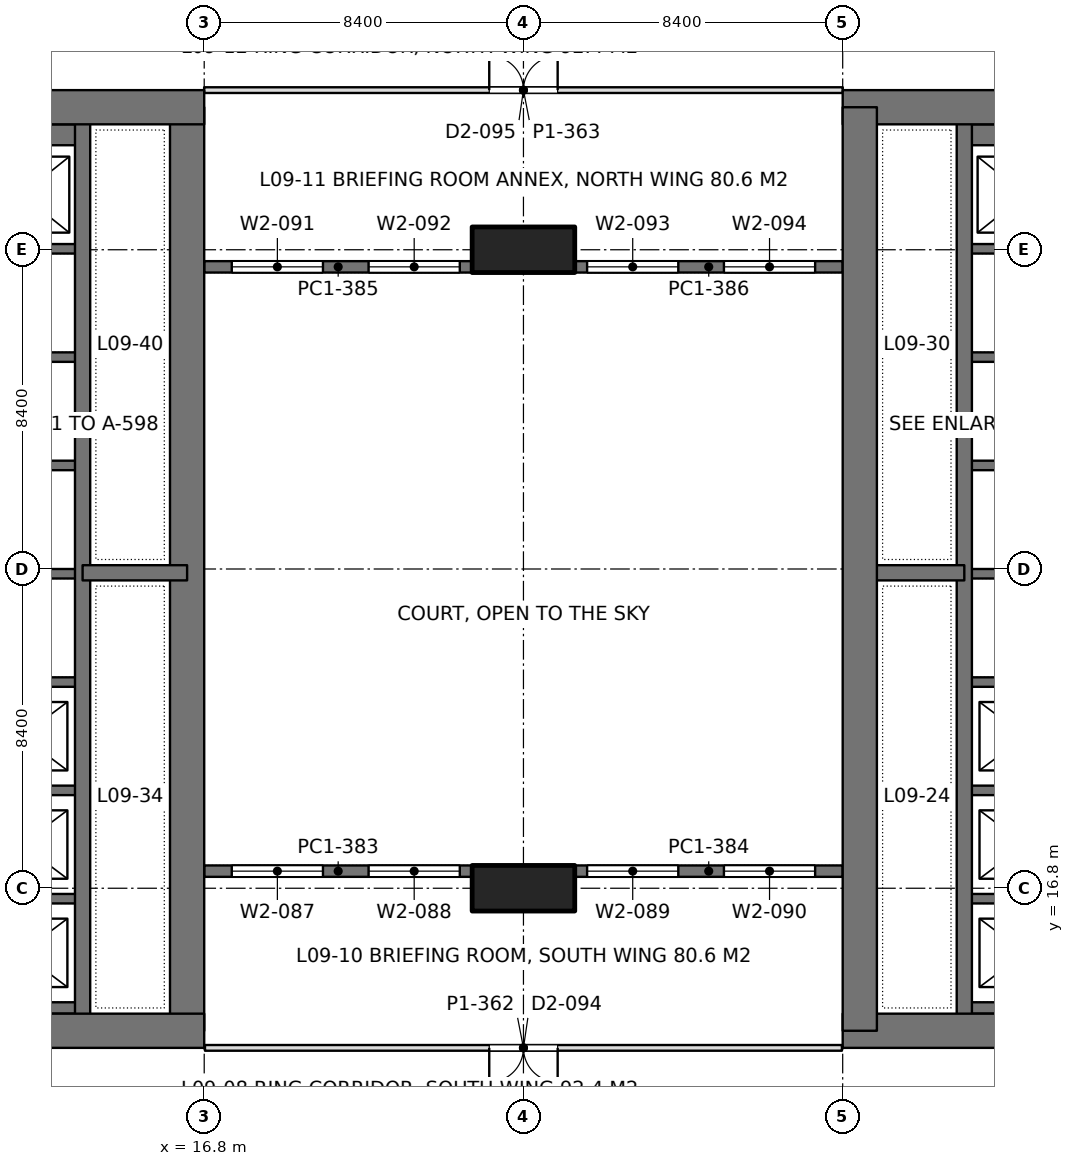
"""IFC4 building model, lengths in metres.
Left out: names, types, materials, properties, quantities, classifications, styles, units other than length and angle.
Written with IfcOpenShell. Run it as: python <this file> out.ifc"""

import sys

from ifc_helpers import new_model, si_unit, direction, frame, frame_2d, origin, origin_2d, place, context, subcontext, project, spatial, rectangle, extrude, element, fill, save


model = new_model("IFC4")
c1 = context("Model", 3, precision=1e-05, world=origin(), true_north=direction((0.0, 1.0)))
c2 = subcontext(c1, "Body", "Model", "MODEL_VIEW")
j1 = project(units=[si_unit("LENGTHUNIT", "METRE"), si_unit("PLANEANGLEUNIT", "RADIAN")], contexts=[c1])
p1 = place(None, origin())
s1 = spatial("IfcSite", under=j1, at=p1, CompositionType="ELEMENT")
p2 = place(p1, origin())
s2 = spatial("IfcBuilding", under=s1, at=p2, CompositionType="ELEMENT")
p3 = place(p2, frame((0.0, 0.0, 41.4)))
s3 = spatial("IfcBuildingStorey", under=s2, at=p3, CompositionType="ELEMENT", Elevation=41.4)
for number, where, z_axis, x_axis in (
    (1, (25.2, 16.8, 0.0), (0.0, 0.0, 1.0), (1.0, 0.0, 0.0)),
    (2, (25.2, 33.6, 0.0), (0.0, 0.0, 1.0), (1.0, 0.0, 0.0)),
):
    element("IfcColumn", number, at=place(p3, frame(where, z_axis=z_axis, x_axis=x_axis)), inside=s3, PredefinedType="COLUMN", context=c2, shape_type="SweptSolid", body=[
        extrude(rectangle(XDim=2.7, YDim=1.2, at=origin_2d()), origin(), (0.0, 0.0, 1.0), 4.5),
    ])
p4 = place(p3, frame((-1.2, 13.05, 0.0), z_axis=(0.0, 0.0, 1.0), x_axis=(1.0, 0.0, 0.0)))
e3 = element("IfcWall", 3, at=p4, inside=s3, PredefinedType="SHEAR", context=c2, shape_type="SweptSolid", body=[
    extrude(rectangle(XDim=18.0, YDim=0.9, at=frame_2d((9.0, 0.0))), origin(), (0.0, 0.0, 1.0), 4.5),
])
p5 = place(p4, frame((8.95, 0.0, 0.0)))
e4 = element("IfcOpeningElement", 4, at=p5, cuts=e3, PredefinedType="OPENING", context=c2, shape_type="SweptSolid", body=[
    extrude(rectangle(XDim=1.8, YDim=2.4, at=frame_2d((0.9, 1.2))), frame((0.0, 0.46, 0.0), z_axis=(0.0, -1.0, 0.0), x_axis=(1.0, 0.0, 0.0)), (0.0, 0.0, 1.0), 0.92),
])
p6 = place(p3, frame((-1.2, 37.35, 0.0), z_axis=(0.0, 0.0, 1.0), x_axis=(1.0, 0.0, 0.0)))
e5 = element("IfcWall", 5, at=p6, inside=s3, PredefinedType="SHEAR", context=c2, shape_type="SweptSolid", body=[
    extrude(rectangle(XDim=18.0, YDim=0.9, at=frame_2d((9.0, 0.0))), origin(), (0.0, 0.0, 1.0), 4.5),
])
p7 = place(p6, frame((8.95, 0.0, 0.0)))
e6 = element("IfcOpeningElement", 6, at=p7, cuts=e5, PredefinedType="OPENING", context=c2, shape_type="SweptSolid", body=[
    extrude(rectangle(XDim=1.8, YDim=2.4, at=frame_2d((0.9, 1.2))), frame((0.0, 0.46, 0.0), z_axis=(0.0, -1.0, 0.0), x_axis=(1.0, 0.0, 0.0)), (0.0, 0.0, 1.0), 0.92),
])
p8 = place(p3, frame((16.35, 13.05, 0.0), z_axis=(0.0, 0.0, 1.0), x_axis=(0.0, 1.0, 0.0)))
e7 = element("IfcWall", 7, at=p8, inside=s3, PredefinedType="SHEAR", context=c2, shape_type="SweptSolid", body=[
    extrude(rectangle(XDim=24.3, YDim=0.9, at=frame_2d((12.15, 0.0))), origin(), (0.0, 0.0, 1.0), 4.5),
])
p9 = place(p3, frame((13.6, 13.05, 0.0), z_axis=(0.0, 0.0, 1.0), x_axis=(0.0, 1.0, 0.0)))
e8 = element("IfcWall", 8, at=p9, inside=s3, PredefinedType="SHEAR", context=c2, shape_type="SweptSolid", body=[
    extrude(rectangle(XDim=24.3, YDim=0.4, at=frame_2d((12.15, 0.0))), origin(), (0.0, 0.0, 1.0), 4.5),
])
p10 = place(p3, frame((13.6, 25.1, 0.0), z_axis=(0.0, 0.0, 1.0), x_axis=(1.0, 0.0, 0.0)))
e9 = element("IfcWall", 9, at=p10, inside=s3, PredefinedType="SHEAR", context=c2, shape_type="SweptSolid", body=[
    extrude(rectangle(XDim=2.75, YDim=0.4, at=frame_2d((1.375, 0.0))), origin(), (0.0, 0.0, 1.0), 4.5),
])
p11 = place(p3, frame((10.4, 13.65, 0.0), z_axis=(0.0, 0.0, 1.0), x_axis=(1.0, 0.0, 0.0)))
e10 = element("IfcWall", 10, at=p11, inside=s3, PredefinedType="SHEAR", context=c2, shape_type="SweptSolid", body=[
    extrude(rectangle(XDim=3.2, YDim=0.3, at=frame_2d((1.6, 0.0))), origin(), (0.0, 0.0, 1.0), 4.5),
])
for number, where, z_axis, x_axis in (
    (11, (10.4, 16.525, 0.0), (0.0, 0.0, 1.0), (1.0, 0.0, 0.0)),
    (12, (10.4, 19.375, 0.0), (0.0, 0.0, 1.0), (1.0, 0.0, 0.0)),
    (13, (10.4, 22.225, 0.0), (0.0, 0.0, 1.0), (1.0, 0.0, 0.0)),
    (14, (10.4, 25.075, 0.0), (0.0, 0.0, 1.0), (1.0, 0.0, 0.0)),
    (15, (10.4, 27.925, 0.0), (0.0, 0.0, 1.0), (1.0, 0.0, 0.0)),
    (16, (10.4, 30.775, 0.0), (0.0, 0.0, 1.0), (1.0, 0.0, 0.0)),
    (17, (10.4, 33.625, 0.0), (0.0, 0.0, 1.0), (1.0, 0.0, 0.0)),
):
    element("IfcWall", number, at=place(p3, frame(where, z_axis=z_axis, x_axis=x_axis)), inside=s3, PredefinedType="SHEAR", context=c2, shape_type="SweptSolid", body=[
        extrude(rectangle(XDim=3.2, YDim=0.25, at=frame_2d((1.6, 0.0))), origin(), (0.0, 0.0, 1.0), 4.5),
    ])
p12 = place(p3, frame((10.4, 36.625, 0.0), z_axis=(0.0, 0.0, 1.0), x_axis=(1.0, 0.0, 0.0)))
e18 = element("IfcWall", 18, at=p12, inside=s3, PredefinedType="SHEAR", context=c2, shape_type="SweptSolid", body=[
    extrude(rectangle(XDim=3.2, YDim=0.55, at=frame_2d((1.6, 0.0))), origin(), (0.0, 0.0, 1.0), 4.5),
])
p13 = place(p3, frame((33.6, 13.05, 0.0), z_axis=(0.0, 0.0, 1.0), x_axis=(1.0, 0.0, 0.0)))
e19 = element("IfcWall", 19, at=p13, inside=s3, PredefinedType="SHEAR", context=c2, shape_type="SweptSolid", body=[
    extrude(rectangle(XDim=18.0, YDim=0.9, at=frame_2d((9.0, 0.0))), origin(), (0.0, 0.0, 1.0), 4.5),
])
p14 = place(p13, frame((7.25, 0.0, 0.0)))
e20 = element("IfcOpeningElement", 20, at=p14, cuts=e19, PredefinedType="OPENING", context=c2, shape_type="SweptSolid", body=[
    extrude(rectangle(XDim=1.8, YDim=2.4, at=frame_2d((0.9, 1.2))), frame((0.0, 0.46, 0.0), z_axis=(0.0, -1.0, 0.0), x_axis=(1.0, 0.0, 0.0)), (0.0, 0.0, 1.0), 0.92),
])
p15 = place(p3, frame((33.6, 37.35, 0.0), z_axis=(0.0, 0.0, 1.0), x_axis=(1.0, 0.0, 0.0)))
e21 = element("IfcWall", 21, at=p15, inside=s3, PredefinedType="SHEAR", context=c2, shape_type="SweptSolid", body=[
    extrude(rectangle(XDim=18.0, YDim=0.9, at=frame_2d((9.0, 0.0))), origin(), (0.0, 0.0, 1.0), 4.5),
])
p16 = place(p15, frame((7.25, 0.0, 0.0)))
e22 = element("IfcOpeningElement", 22, at=p16, cuts=e21, PredefinedType="OPENING", context=c2, shape_type="SweptSolid", body=[
    extrude(rectangle(XDim=1.8, YDim=2.4, at=frame_2d((0.9, 1.2))), frame((0.0, 0.46, 0.0), z_axis=(0.0, -1.0, 0.0), x_axis=(1.0, 0.0, 0.0)), (0.0, 0.0, 1.0), 0.92),
])
p17 = place(p3, frame((34.05, 13.05, 0.0), z_axis=(0.0, 0.0, 1.0), x_axis=(0.0, 1.0, 0.0)))
e23 = element("IfcWall", 23, at=p17, inside=s3, PredefinedType="SHEAR", context=c2, shape_type="SweptSolid", body=[
    extrude(rectangle(XDim=24.3, YDim=0.9, at=frame_2d((12.15, 0.0))), origin(), (0.0, 0.0, 1.0), 4.5),
])
p18 = place(p3, frame((36.8, 13.05, 0.0), z_axis=(0.0, 0.0, 1.0), x_axis=(0.0, 1.0, 0.0)))
e24 = element("IfcWall", 24, at=p18, inside=s3, PredefinedType="SHEAR", context=c2, shape_type="SweptSolid", body=[
    extrude(rectangle(XDim=24.3, YDim=0.4, at=frame_2d((12.15, 0.0))), origin(), (0.0, 0.0, 1.0), 4.5),
])
p19 = place(p3, frame((36.8, 25.1, 0.0), z_axis=(0.0, 0.0, 1.0), x_axis=(-1.0, 0.0, 0.0)))
e25 = element("IfcWall", 25, at=p19, inside=s3, PredefinedType="SHEAR", context=c2, shape_type="SweptSolid", body=[
    extrude(rectangle(XDim=2.75, YDim=0.4, at=frame_2d((1.375, 0.0))), origin(), (0.0, 0.0, 1.0), 4.5),
])
p20 = place(p3, frame((40.0, 13.65, 0.0), z_axis=(0.0, 0.0, 1.0), x_axis=(-1.0, 0.0, 0.0)))
e26 = element("IfcWall", 26, at=p20, inside=s3, PredefinedType="SHEAR", context=c2, shape_type="SweptSolid", body=[
    extrude(rectangle(XDim=3.2, YDim=0.3, at=frame_2d((1.6, 0.0))), origin(), (0.0, 0.0, 1.0), 4.5),
])
for number, where, z_axis, x_axis in (
    (27, (40.0, 16.525, 0.0), (0.0, 0.0, 1.0), (-1.0, 0.0, 0.0)),
    (28, (40.0, 19.375, 0.0), (0.0, 0.0, 1.0), (-1.0, 0.0, 0.0)),
    (29, (40.0, 22.225, 0.0), (0.0, 0.0, 1.0), (-1.0, 0.0, 0.0)),
    (30, (40.0, 25.075, 0.0), (0.0, 0.0, 1.0), (-1.0, 0.0, 0.0)),
    (31, (40.0, 27.925, 0.0), (0.0, 0.0, 1.0), (-1.0, 0.0, 0.0)),
    (32, (40.0, 30.775, 0.0), (0.0, 0.0, 1.0), (-1.0, 0.0, 0.0)),
    (33, (40.0, 33.625, 0.0), (0.0, 0.0, 1.0), (-1.0, 0.0, 0.0)),
):
    element("IfcWall", number, at=place(p3, frame(where, z_axis=z_axis, x_axis=x_axis)), inside=s3, PredefinedType="SHEAR", context=c2, shape_type="SweptSolid", body=[
        extrude(rectangle(XDim=3.2, YDim=0.25, at=frame_2d((1.6, 0.0))), origin(), (0.0, 0.0, 1.0), 4.5),
    ])
p21 = place(p3, frame((40.0, 36.625, 0.0), z_axis=(0.0, 0.0, 1.0), x_axis=(-1.0, 0.0, 0.0)))
e34 = element("IfcWall", 34, at=p21, inside=s3, PredefinedType="SHEAR", context=c2, shape_type="SweptSolid", body=[
    extrude(rectangle(XDim=3.2, YDim=0.55, at=frame_2d((1.6, 0.0))), origin(), (0.0, 0.0, 1.0), 4.5),
])
p22 = place(p3, frame((16.8, 17.25, 0.0), z_axis=(0.0, 0.0, 1.0), x_axis=(1.0, 0.0, 0.0)))
e35 = element("IfcWall", 35, at=p22, inside=s3, PredefinedType="SOLIDWALL", context=c2, shape_type="SweptSolid", body=[
    extrude(rectangle(XDim=7.05, YDim=0.3, at=frame_2d((3.525, 0.0))), origin(), (0.0, 0.0, 1.0), 4.34),
])
p23 = place(p22, frame((0.725, 0.0, 0.9)))
e36 = element("IfcOpeningElement", 36, at=p23, cuts=e35, PredefinedType="OPENING", context=c2, shape_type="SweptSolid", body=[
    extrude(rectangle(XDim=2.4, YDim=1.9, at=frame_2d((1.2, 0.95))), frame((0.0, 0.16, 0.0), z_axis=(0.0, -1.0, 0.0), x_axis=(1.0, 0.0, 0.0)), (0.0, 0.0, 1.0), 0.32),
])
p24 = place(p22, frame((4.325, 0.0, 0.9)))
e37 = element("IfcOpeningElement", 37, at=p24, cuts=e35, PredefinedType="OPENING", context=c2, shape_type="SweptSolid", body=[
    extrude(rectangle(XDim=2.4, YDim=1.9, at=frame_2d((1.2, 0.95))), frame((0.0, 0.16, 0.0), z_axis=(0.0, -1.0, 0.0), x_axis=(1.0, 0.0, 0.0)), (0.0, 0.0, 1.0), 0.32),
])
p25 = place(p3, frame((26.55, 17.25, 0.0), z_axis=(0.0, 0.0, 1.0), x_axis=(1.0, 0.0, 0.0)))
e38 = element("IfcWall", 38, at=p25, inside=s3, PredefinedType="SOLIDWALL", context=c2, shape_type="SweptSolid", body=[
    extrude(rectangle(XDim=7.05, YDim=0.3, at=frame_2d((3.525, 0.0))), origin(), (0.0, 0.0, 1.0), 4.34),
])
p26 = place(p25, frame((0.325, 0.0, 0.9)))
e39 = element("IfcOpeningElement", 39, at=p26, cuts=e38, PredefinedType="OPENING", context=c2, shape_type="SweptSolid", body=[
    extrude(rectangle(XDim=2.4, YDim=1.9, at=frame_2d((1.2, 0.95))), frame((0.0, 0.16, 0.0), z_axis=(0.0, -1.0, 0.0), x_axis=(1.0, 0.0, 0.0)), (0.0, 0.0, 1.0), 0.32),
])
p27 = place(p25, frame((3.925, 0.0, 0.9)))
e40 = element("IfcOpeningElement", 40, at=p27, cuts=e38, PredefinedType="OPENING", context=c2, shape_type="SweptSolid", body=[
    extrude(rectangle(XDim=2.4, YDim=1.9, at=frame_2d((1.2, 0.95))), frame((0.0, 0.16, 0.0), z_axis=(0.0, -1.0, 0.0), x_axis=(1.0, 0.0, 0.0)), (0.0, 0.0, 1.0), 0.32),
])
p28 = place(p3, frame((16.8, 33.15, 0.0), z_axis=(0.0, 0.0, 1.0), x_axis=(1.0, 0.0, 0.0)))
e41 = element("IfcWall", 41, at=p28, inside=s3, PredefinedType="SOLIDWALL", context=c2, shape_type="SweptSolid", body=[
    extrude(rectangle(XDim=7.05, YDim=0.3, at=frame_2d((3.525, 0.0))), origin(), (0.0, 0.0, 1.0), 4.34),
])
p29 = place(p28, frame((0.725, 0.0, 0.9)))
e42 = element("IfcOpeningElement", 42, at=p29, cuts=e41, PredefinedType="OPENING", context=c2, shape_type="SweptSolid", body=[
    extrude(rectangle(XDim=2.4, YDim=1.9, at=frame_2d((1.2, 0.95))), frame((0.0, 0.16, 0.0), z_axis=(0.0, -1.0, 0.0), x_axis=(1.0, 0.0, 0.0)), (0.0, 0.0, 1.0), 0.32),
])
p30 = place(p28, frame((4.325, 0.0, 0.9)))
e43 = element("IfcOpeningElement", 43, at=p30, cuts=e41, PredefinedType="OPENING", context=c2, shape_type="SweptSolid", body=[
    extrude(rectangle(XDim=2.4, YDim=1.9, at=frame_2d((1.2, 0.95))), frame((0.0, 0.16, 0.0), z_axis=(0.0, -1.0, 0.0), x_axis=(1.0, 0.0, 0.0)), (0.0, 0.0, 1.0), 0.32),
])
p31 = place(p3, frame((26.55, 33.15, 0.0), z_axis=(0.0, 0.0, 1.0), x_axis=(1.0, 0.0, 0.0)))
e44 = element("IfcWall", 44, at=p31, inside=s3, PredefinedType="SOLIDWALL", context=c2, shape_type="SweptSolid", body=[
    extrude(rectangle(XDim=7.05, YDim=0.3, at=frame_2d((3.525, 0.0))), origin(), (0.0, 0.0, 1.0), 4.34),
])
p32 = place(p31, frame((0.325, 0.0, 0.9)))
e45 = element("IfcOpeningElement", 45, at=p32, cuts=e44, PredefinedType="OPENING", context=c2, shape_type="SweptSolid", body=[
    extrude(rectangle(XDim=2.4, YDim=1.9, at=frame_2d((1.2, 0.95))), frame((0.0, 0.16, 0.0), z_axis=(0.0, -1.0, 0.0), x_axis=(1.0, 0.0, 0.0)), (0.0, 0.0, 1.0), 0.32),
])
p33 = place(p31, frame((3.925, 0.0, 0.9)))
e46 = element("IfcOpeningElement", 46, at=p33, cuts=e44, PredefinedType="OPENING", context=c2, shape_type="SweptSolid", body=[
    extrude(rectangle(XDim=2.4, YDim=1.9, at=frame_2d((1.2, 0.95))), frame((0.0, 0.16, 0.0), z_axis=(0.0, -1.0, 0.0), x_axis=(1.0, 0.0, 0.0)), (0.0, 0.0, 1.0), 0.32),
])
p34 = place(p3, frame((16.82, 12.6, 0.0), z_axis=(0.0, 0.0, 1.0), x_axis=(1.0, 0.0, 0.0)))
e47 = element("IfcWall", 47, at=p34, inside=s3, PredefinedType="PARTITIONING", context=c2, shape_type="SweptSolid", body=[
    extrude(rectangle(XDim=16.76, YDim=0.15, at=frame_2d((8.38, 0.0))), origin(), (0.0, 0.0, 1.0), 3.74),
])
p35 = place(p34, frame((7.48, 0.0, 0.0)))
e48 = element("IfcOpeningElement", 48, at=p35, cuts=e47, PredefinedType="OPENING", context=c2, shape_type="SweptSolid", body=[
    extrude(rectangle(XDim=1.8, YDim=2.2, at=frame_2d((0.9, 1.1))), frame((0.0, 0.085, 0.0), z_axis=(0.0, -1.0, 0.0), x_axis=(1.0, 0.0, 0.0)), (0.0, 0.0, 1.0), 0.17),
])
p36 = place(p3, frame((16.798, 37.8, 0.0), z_axis=(0.0, 0.0, 1.0), x_axis=(1.0, 0.0, 0.0)))
e49 = element("IfcWall", 49, at=p36, inside=s3, PredefinedType="PARTITIONING", context=c2, shape_type="SweptSolid", body=[
    extrude(rectangle(XDim=16.804, YDim=0.15, at=frame_2d((8.402, 0.0))), origin(), (0.0, 0.0, 1.0), 3.74),
])
p37 = place(p36, frame((7.502, 0.0, 0.0)))
e50 = element("IfcOpeningElement", 50, at=p37, cuts=e49, PredefinedType="OPENING", context=c2, shape_type="SweptSolid", body=[
    extrude(rectangle(XDim=1.8, YDim=2.2, at=frame_2d((0.9, 1.1))), frame((0.0, 0.085, 0.0), z_axis=(0.0, -1.0, 0.0), x_axis=(1.0, 0.0, 0.0)), (0.0, 0.0, 1.0), 0.17),
])
p38 = place(p23, origin())
e51 = element("IfcWindow", 51, at=p38, inside=s3, PartitioningType="SINGLE_PANEL", PredefinedType="WINDOW", context=c2, shape_type="SweptSolid", body=[
    extrude(rectangle(XDim=2.4, YDim=1.9, at=frame_2d((1.2, 0.95))), frame((0.0, 0.03, 0.0), z_axis=(0.0, -1.0, 0.0), x_axis=(1.0, 0.0, 0.0)), (0.0, 0.0, 1.0), 0.06),
])
fill(e36, e51)
p39 = place(p24, origin())
e52 = element("IfcWindow", 52, at=p39, inside=s3, PartitioningType="SINGLE_PANEL", PredefinedType="WINDOW", context=c2, shape_type="SweptSolid", body=[
    extrude(rectangle(XDim=2.4, YDim=1.9, at=frame_2d((1.2, 0.95))), frame((0.0, 0.03, 0.0), z_axis=(0.0, -1.0, 0.0), x_axis=(1.0, 0.0, 0.0)), (0.0, 0.0, 1.0), 0.06),
])
fill(e37, e52)
p40 = place(p26, origin())
e53 = element("IfcWindow", 53, at=p40, inside=s3, PartitioningType="SINGLE_PANEL", PredefinedType="WINDOW", context=c2, shape_type="SweptSolid", body=[
    extrude(rectangle(XDim=2.4, YDim=1.9, at=frame_2d((1.2, 0.95))), frame((0.0, 0.03, 0.0), z_axis=(0.0, -1.0, 0.0), x_axis=(1.0, 0.0, 0.0)), (0.0, 0.0, 1.0), 0.06),
])
fill(e39, e53)
p41 = place(p27, origin())
e54 = element("IfcWindow", 54, at=p41, inside=s3, PartitioningType="SINGLE_PANEL", PredefinedType="WINDOW", context=c2, shape_type="SweptSolid", body=[
    extrude(rectangle(XDim=2.4, YDim=1.9, at=frame_2d((1.2, 0.95))), frame((0.0, 0.03, 0.0), z_axis=(0.0, -1.0, 0.0), x_axis=(1.0, 0.0, 0.0)), (0.0, 0.0, 1.0), 0.06),
])
fill(e40, e54)
p42 = place(p29, origin())
e55 = element("IfcWindow", 55, at=p42, inside=s3, PartitioningType="SINGLE_PANEL", PredefinedType="WINDOW", context=c2, shape_type="SweptSolid", body=[
    extrude(rectangle(XDim=2.4, YDim=1.9, at=frame_2d((1.2, 0.95))), frame((0.0, 0.03, 0.0), z_axis=(0.0, -1.0, 0.0), x_axis=(1.0, 0.0, 0.0)), (0.0, 0.0, 1.0), 0.06),
])
fill(e42, e55)
p43 = place(p30, origin())
e56 = element("IfcWindow", 56, at=p43, inside=s3, PartitioningType="SINGLE_PANEL", PredefinedType="WINDOW", context=c2, shape_type="SweptSolid", body=[
    extrude(rectangle(XDim=2.4, YDim=1.9, at=frame_2d((1.2, 0.95))), frame((0.0, 0.03, 0.0), z_axis=(0.0, -1.0, 0.0), x_axis=(1.0, 0.0, 0.0)), (0.0, 0.0, 1.0), 0.06),
])
fill(e43, e56)
p44 = place(p32, origin())
e57 = element("IfcWindow", 57, at=p44, inside=s3, PartitioningType="SINGLE_PANEL", PredefinedType="WINDOW", context=c2, shape_type="SweptSolid", body=[
    extrude(rectangle(XDim=2.4, YDim=1.9, at=frame_2d((1.2, 0.95))), frame((0.0, 0.03, 0.0), z_axis=(0.0, -1.0, 0.0), x_axis=(1.0, 0.0, 0.0)), (0.0, 0.0, 1.0), 0.06),
])
fill(e45, e57)
p45 = place(p33, origin())
e58 = element("IfcWindow", 58, at=p45, inside=s3, PartitioningType="SINGLE_PANEL", PredefinedType="WINDOW", context=c2, shape_type="SweptSolid", body=[
    extrude(rectangle(XDim=2.4, YDim=1.9, at=frame_2d((1.2, 0.95))), frame((0.0, 0.03, 0.0), z_axis=(0.0, -1.0, 0.0), x_axis=(1.0, 0.0, 0.0)), (0.0, 0.0, 1.0), 0.06),
])
fill(e46, e58)
p46 = place(p35, frame((1.8, 0.0, 0.0), z_axis=(0.0, 0.0, 1.0), x_axis=(-1.0, 0.0, 0.0)))
e59 = element("IfcDoor", 59, at=p46, inside=s3, OperationType="DOUBLE_DOOR_SINGLE_SWING", PredefinedType="DOOR", context=c2, shape_type="SweptSolid", body=[
    extrude(rectangle(XDim=1.8, YDim=2.2, at=frame_2d((0.9, 1.1))), frame((0.0, 0.025, 0.0), z_axis=(0.0, -1.0, 0.0), x_axis=(1.0, 0.0, 0.0)), (0.0, 0.0, 1.0), 0.05),
])
fill(e48, e59)
p47 = place(p37, origin())
e60 = element("IfcDoor", 60, at=p47, inside=s3, OperationType="DOUBLE_DOOR_SINGLE_SWING", PredefinedType="DOOR", context=c2, shape_type="SweptSolid", body=[
    extrude(rectangle(XDim=1.8, YDim=2.2, at=frame_2d((0.9, 1.1))), frame((0.0, 0.025, 0.0), z_axis=(0.0, -1.0, 0.0), x_axis=(1.0, 0.0, 0.0)), (0.0, 0.0, 1.0), 0.05),
])
fill(e50, e60)
save(model, sys.argv[1])
